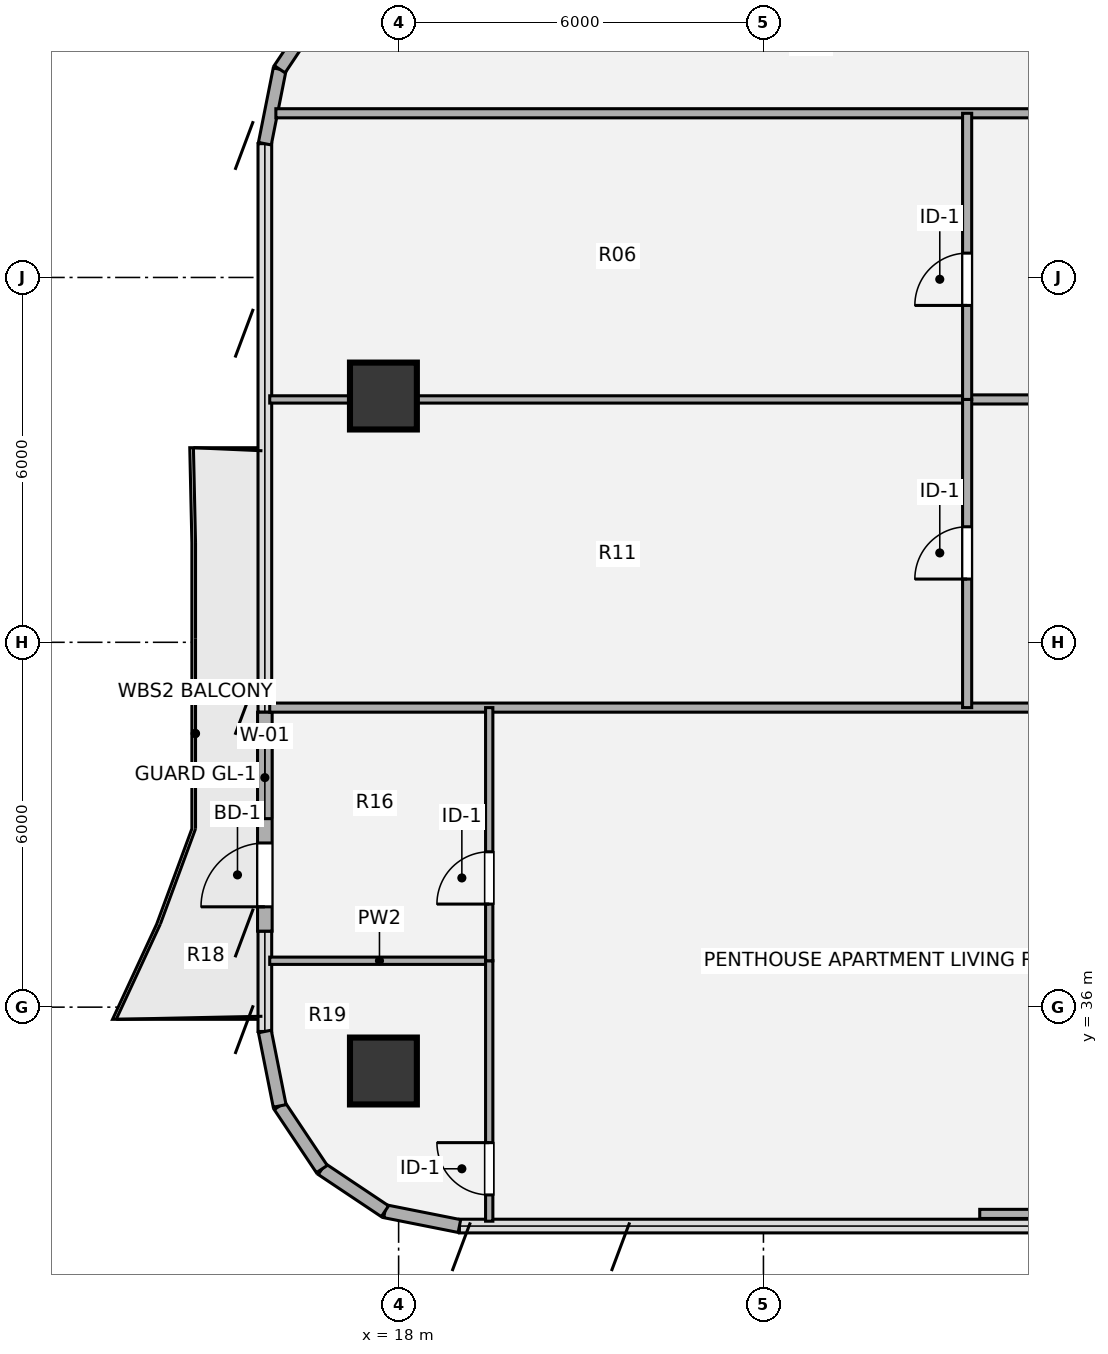
"""IFC4 building model, lengths in metres.
Left out: names, types, materials, properties, quantities, classifications, styles, units other than length and angle.
Written with IfcOpenShell. Run it as: python <this file> out.ifc"""

import sys

from ifc_helpers import new_model, si_unit, direction, frame, frame_2d, origin, origin_2d, place, context, subcontext, project, spatial, rectangle, hollow_circle, extrude, source, transform, mapped, element, fill, save


model = new_model("IFC4")
c1 = context("Model", 3, precision=1e-05, world=origin(), true_north=direction((0.0, 1.0)))
c2 = subcontext(c1, "Body", "Model", "MODEL_VIEW")
j1 = project(units=[si_unit("LENGTHUNIT", "METRE"), si_unit("PLANEANGLEUNIT", "RADIAN")], contexts=[c1])
p1 = place(None, origin())
s1 = spatial("IfcSite", under=j1, at=p1, CompositionType="ELEMENT")
p2 = place(p1, origin())
s2 = spatial("IfcBuilding", under=s1, at=p2, CompositionType="ELEMENT")
p3 = place(p2, frame((0.0, 0.0, 209.34)))
s3 = spatial("IfcBuildingStorey", under=s2, at=p3, CompositionType="ELEMENT", Elevation=209.34)
m1 = source(origin(), c2, "Body", "SweptSolid", [
    extrude(hollow_circle(Radius=0.55, WallThickness=0.04, at=origin_2d()), origin(), (0.0, 0.0, 1.0), 3.372),
])
for number, where, z_axis, x_axis in (
    (1, (17.75, 34.95, 0.0), (0.0, 0.0, 1.0), (1.0, 0.0, 0.0)),
    (2, (17.75, 46.05, 0.0), (0.0, 0.0, 1.0), (1.0, 0.0, 0.0)),
):
    element("IfcColumn", number, at=place(p3, frame(where, z_axis=z_axis, x_axis=x_axis)), inside=s3, PredefinedType="COLUMN", context=c2, shape_type="MappedRepresentation", body=[
        mapped(m1, transform((0.0, 0.0, 0.0), x_axis=(1.0, 0.0, 0.0), y_axis=(0.0, 1.0, 0.0), z_axis=(0.0, 0.0, 1.0), scale=1.0)),
    ])
for number, where, z_axis, x_axis in (
    (3, (19.0, 32.4, 0.0), (0.0, 0.0, 1.0), (-0.981, 0.195, 0.0)),
    (4, (17.775, 32.644, 0.0), (0.0, 0.0, 1.0), (-0.831, 0.556, 0.0)),
    (5, (16.737, 33.337, 0.0), (0.0, 0.0, 1.0), (-0.556, 0.831, 0.0)),
    (6, (16.044, 34.375, 0.0), (0.0, 0.0, 1.0), (-0.195, 0.981, 0.0)),
):
    element("IfcWall", number, at=place(p3, frame(where, z_axis=z_axis, x_axis=x_axis)), inside=s3, PredefinedType="SOLIDWALL", context=c2, shape_type="SweptSolid", body=[
        extrude(rectangle(XDim=1.249, YDim=0.215, at=frame_2d((0.624, 0.0))), origin(), (0.0, 0.0, 1.0), 3.372),
    ])
p4 = place(p3, frame((15.8, 37.25, 0.0), z_axis=(0.0, 0.0, 1.0), x_axis=(0.0, 1.0, 0.0)))
e7 = element("IfcWall", 7, at=p4, inside=s3, PredefinedType="SOLIDWALL", context=c2, shape_type="SweptSolid", body=[
    extrude(rectangle(XDim=3.6, YDim=0.24, at=frame_2d((1.8, 0.0))), origin(), (0.0, 0.0, 1.0), 3.372),
])
p5 = place(p4, frame((0.4, 0.0, 0.0)))
e8 = element("IfcOpeningElement", 8, at=p5, cuts=e7, PredefinedType="OPENING", context=c2, shape_type="SweptSolid", body=[
    extrude(rectangle(XDim=1.05, YDim=2.15, at=origin_2d()), frame((0.525, 0.13, 1.075), z_axis=(0.0, -1.0, 0.0), x_axis=(1.0, 0.0, 0.0)), (0.0, 0.0, 1.0), 0.26),
])
p6 = place(p4, frame((1.85, 0.0, 0.85)))
e9 = element("IfcOpeningElement", 9, at=p6, cuts=e7, PredefinedType="OPENING", context=c2, shape_type="SweptSolid", body=[
    extrude(rectangle(XDim=1.35, YDim=1.35, at=origin_2d()), frame((0.675, 0.13, 0.675), z_axis=(0.0, -1.0, 0.0), x_axis=(1.0, 0.0, 0.0)), (0.0, 0.0, 1.0), 0.26),
])
for number, where, z_axis, x_axis in (
    (10, (15.8, 50.2, 0.0), (0.0, 0.0, 1.0), (0.195, 0.981, 0.0)),
    (11, (16.044, 51.425, 0.0), (0.0, 0.0, 1.0), (0.556, 0.831, 0.0)),
):
    element("IfcWall", number, at=place(p3, frame(where, z_axis=z_axis, x_axis=x_axis)), inside=s3, PredefinedType="SOLIDWALL", context=c2, shape_type="SweptSolid", body=[
        extrude(rectangle(XDim=1.249, YDim=0.215, at=frame_2d((0.624, 0.0))), origin(), (0.0, 0.0, 1.0), 3.372),
    ])
p7 = place(p3, frame((27.557, 32.6, 0.0), z_axis=(0.0, 0.0, 1.0), x_axis=(1.0, 0.0, 0.0)))
e12 = element("IfcWall", 12, at=p7, inside=s3, PredefinedType="PARTITIONING", context=c2, shape_type="SweptSolid", body=[
    extrude(rectangle(XDim=5.993, YDim=0.15, at=frame_2d((2.997, 0.0))), origin(), (0.0, 0.0, 1.0), 3.342),
])
p8 = place(p3, frame((15.88, 36.763, 0.0), z_axis=(0.0, 0.0, 1.0), x_axis=(1.0, 0.0, 0.0)))
e13 = element("IfcWall", 13, at=p8, inside=s3, PredefinedType="PARTITIONING", context=c2, shape_type="SweptSolid", body=[
    extrude(rectangle(XDim=3.61, YDim=0.12, at=frame_2d((1.805, 0.0))), origin(), (0.0, 0.0, 1.0), 2.824),
])
p9 = place(p3, frame((15.88, 40.926, 0.0), z_axis=(0.0, 0.0, 1.0), x_axis=(1.0, 0.0, 0.0)))
e14 = element("IfcWall", 14, at=p9, inside=s3, PredefinedType="PARTITIONING", context=c2, shape_type="SweptSolid", body=[
    extrude(rectangle(XDim=17.67, YDim=0.15, at=frame_2d((8.835, 0.0))), origin(), (0.0, 0.0, 1.0), 2.824),
])
p10 = place(p3, frame((15.88, 45.994, 0.0), z_axis=(0.0, 0.0, 1.0), x_axis=(1.0, 0.0, 0.0)))
e15 = element("IfcWall", 15, at=p10, inside=s3, PredefinedType="PARTITIONING", context=c2, shape_type="SweptSolid", body=[
    extrude(rectangle(XDim=11.47, YDim=0.12, at=frame_2d((5.735, 0.0))), origin(), (0.0, 0.0, 1.0), 2.457),
])
p11 = place(p3, frame((27.35, 45.994, 0.0), z_axis=(0.0, 0.0, 1.0), x_axis=(1.0, 0.0, 0.0)))
e16 = element("IfcWall", 16, at=p11, inside=s3, PredefinedType="PARTITIONING", context=c2, shape_type="SweptSolid", body=[
    extrude(rectangle(XDim=6.2, YDim=0.15, at=frame_2d((3.1, 0.0))), origin(), (0.0, 0.0, 1.0), 2.457),
])
p12 = place(p3, frame((15.981, 50.7, 0.0), z_axis=(0.0, 0.0, 1.0), x_axis=(1.0, 0.0, 0.0)))
e17 = element("IfcWall", 17, at=p12, inside=s3, PredefinedType="PARTITIONING", context=c2, shape_type="SweptSolid", body=[
    extrude(rectangle(XDim=17.569, YDim=0.15, at=frame_2d((8.785, 0.0))), origin(), (0.0, 0.0, 1.0), 3.15),
])
p13 = place(p3, frame((19.49, 32.48, 0.0), z_axis=(0.0, 0.0, 1.0), x_axis=(0.0, 1.0, 0.0)))
e18 = element("IfcWall", 18, at=p13, inside=s3, PredefinedType="PARTITIONING", context=c2, shape_type="SweptSolid", body=[
    extrude(rectangle(XDim=4.283, YDim=0.12, at=frame_2d((2.142, 0.0))), origin(), (0.0, 0.0, 1.0), 3.342),
])
p14 = place(p13, frame((0.432, 0.0, 0.0)))
e19 = element("IfcOpeningElement", 19, at=p14, cuts=e18, PredefinedType="OPENING", context=c2, shape_type="SweptSolid", body=[
    extrude(rectangle(XDim=0.86, YDim=2.1, at=origin_2d()), frame((0.43, 0.07, 1.05), z_axis=(0.0, -1.0, 0.0), x_axis=(1.0, 0.0, 0.0)), (0.0, 0.0, 1.0), 0.14),
])
p15 = place(p3, frame((19.49, 36.763, 0.0), z_axis=(0.0, 0.0, 1.0), x_axis=(0.0, 1.0, 0.0)))
e20 = element("IfcWall", 20, at=p15, inside=s3, PredefinedType="PARTITIONING", context=c2, shape_type="SweptSolid", body=[
    extrude(rectangle(XDim=4.163, YDim=0.12, at=frame_2d((2.082, 0.0))), origin(), (0.0, 0.0, 1.0), 3.342),
])
p16 = place(p15, frame((0.932, 0.0, 0.0)))
e21 = element("IfcOpeningElement", 21, at=p16, cuts=e20, PredefinedType="OPENING", context=c2, shape_type="SweptSolid", body=[
    extrude(rectangle(XDim=0.86, YDim=2.1, at=origin_2d()), frame((0.43, 0.07, 1.05), z_axis=(0.0, -1.0, 0.0), x_axis=(1.0, 0.0, 0.0)), (0.0, 0.0, 1.0), 0.14),
])
p17 = place(p3, frame((27.35, 40.926, 0.0), z_axis=(0.0, 0.0, 1.0), x_axis=(0.0, 1.0, 0.0)))
e22 = element("IfcWall", 22, at=p17, inside=s3, PredefinedType="PARTITIONING", context=c2, shape_type="SweptSolid", body=[
    extrude(rectangle(XDim=5.068, YDim=0.15, at=frame_2d((2.534, 0.0))), origin(), (0.0, 0.0, 1.0), 3.342),
])
p18 = place(p17, frame((2.114, 0.0, 0.0)))
e23 = element("IfcOpeningElement", 23, at=p18, cuts=e22, PredefinedType="OPENING", context=c2, shape_type="SweptSolid", body=[
    extrude(rectangle(XDim=0.86, YDim=2.1, at=origin_2d()), frame((0.43, 0.085, 1.05), z_axis=(0.0, -1.0, 0.0), x_axis=(1.0, 0.0, 0.0)), (0.0, 0.0, 1.0), 0.17),
])
p19 = place(p3, frame((27.35, 45.994, 0.0), z_axis=(0.0, 0.0, 1.0), x_axis=(0.0, 1.0, 0.0)))
e24 = element("IfcWall", 24, at=p19, inside=s3, PredefinedType="PARTITIONING", context=c2, shape_type="SweptSolid", body=[
    extrude(rectangle(XDim=4.706, YDim=0.15, at=frame_2d((2.353, 0.0))), origin(), (0.0, 0.0, 1.0), 3.342),
])
p20 = place(p19, frame((1.546, 0.0, 0.0)))
e25 = element("IfcOpeningElement", 25, at=p20, cuts=e24, PredefinedType="OPENING", context=c2, shape_type="SweptSolid", body=[
    extrude(rectangle(XDim=0.86, YDim=2.1, at=origin_2d()), frame((0.43, 0.085, 1.05), z_axis=(0.0, -1.0, 0.0), x_axis=(1.0, 0.0, 0.0)), (0.0, 0.0, 1.0), 0.17),
])
m2 = source(origin(), c2, "Body", "SweptSolid", [
    extrude(rectangle(XDim=1.05, YDim=2.15, at=origin_2d()), frame((0.525, 0.025, 1.075), z_axis=(0.0, -1.0, 0.0), x_axis=(1.0, 0.0, 0.0)), (0.0, 0.0, 1.0), 0.05),
])
p21 = place(p5, origin())
e26 = element("IfcDoor", 26, at=p21, inside=s3, OperationType="SINGLE_SWING_LEFT", PredefinedType="DOOR", context=c2, shape_type="MappedRepresentation", body=[
    mapped(m2, transform((0.0, 0.0, 0.0), x_axis=(1.0, 0.0, 0.0), y_axis=(0.0, 1.0, 0.0), z_axis=(0.0, 0.0, 1.0), scale=1.0)),
])
fill(e8, e26)
m3 = source(origin(), c2, "Body", "SweptSolid", [
    extrude(rectangle(XDim=1.35, YDim=1.35, at=origin_2d()), frame((0.675, 0.03, 0.675), z_axis=(0.0, -1.0, 0.0), x_axis=(1.0, 0.0, 0.0)), (0.0, 0.0, 1.0), 0.06),
])
p22 = place(p6, origin())
e27 = element("IfcWindow", 27, at=p22, inside=s3, PartitioningType="SINGLE_PANEL", PredefinedType="WINDOW", context=c2, shape_type="MappedRepresentation", body=[
    mapped(m3, transform((0.0, 0.0, 0.0), x_axis=(1.0, 0.0, 0.0), y_axis=(0.0, 1.0, 0.0), z_axis=(0.0, 0.0, 1.0), scale=1.0)),
])
fill(e9, e27)
m4 = source(origin(), c2, "Body", "SweptSolid", [
    extrude(rectangle(XDim=0.86, YDim=2.1, at=origin_2d()), frame((0.43, 0.025, 1.05), z_axis=(0.0, -1.0, 0.0), x_axis=(1.0, 0.0, 0.0)), (0.0, 0.0, 1.0), 0.05),
])
p23 = place(p14, origin())
e28 = element("IfcDoor", 28, at=p23, inside=s3, OperationType="SINGLE_SWING_RIGHT", PredefinedType="DOOR", context=c2, shape_type="MappedRepresentation", body=[
    mapped(m4, transform((0.0, 0.0, 0.0), x_axis=(1.0, 0.0, 0.0), y_axis=(0.0, 1.0, 0.0), z_axis=(0.0, 0.0, 1.0), scale=1.0)),
])
fill(e19, e28)
p24 = place(p16, origin())
e29 = element("IfcDoor", 29, at=p24, inside=s3, OperationType="SINGLE_SWING_LEFT", PredefinedType="DOOR", context=c2, shape_type="MappedRepresentation", body=[
    mapped(m4, transform((0.0, 0.0, 0.0), x_axis=(1.0, 0.0, 0.0), y_axis=(0.0, 1.0, 0.0), z_axis=(0.0, 0.0, 1.0), scale=1.0)),
])
fill(e21, e29)
p25 = place(p18, origin())
e30 = element("IfcDoor", 30, at=p25, inside=s3, OperationType="SINGLE_SWING_LEFT", PredefinedType="DOOR", context=c2, shape_type="MappedRepresentation", body=[
    mapped(m4, transform((0.0, 0.0, 0.0), x_axis=(1.0, 0.0, 0.0), y_axis=(0.0, 1.0, 0.0), z_axis=(0.0, 0.0, 1.0), scale=1.0)),
])
fill(e23, e30)
p26 = place(p20, origin())
e31 = element("IfcDoor", 31, at=p26, inside=s3, OperationType="SINGLE_SWING_LEFT", PredefinedType="DOOR", context=c2, shape_type="MappedRepresentation", body=[
    mapped(m4, transform((0.0, 0.0, 0.0), x_axis=(1.0, 0.0, 0.0), y_axis=(0.0, 1.0, 0.0), z_axis=(0.0, 0.0, 1.0), scale=1.0)),
])
fill(e25, e31)
save(model, sys.argv[1])
